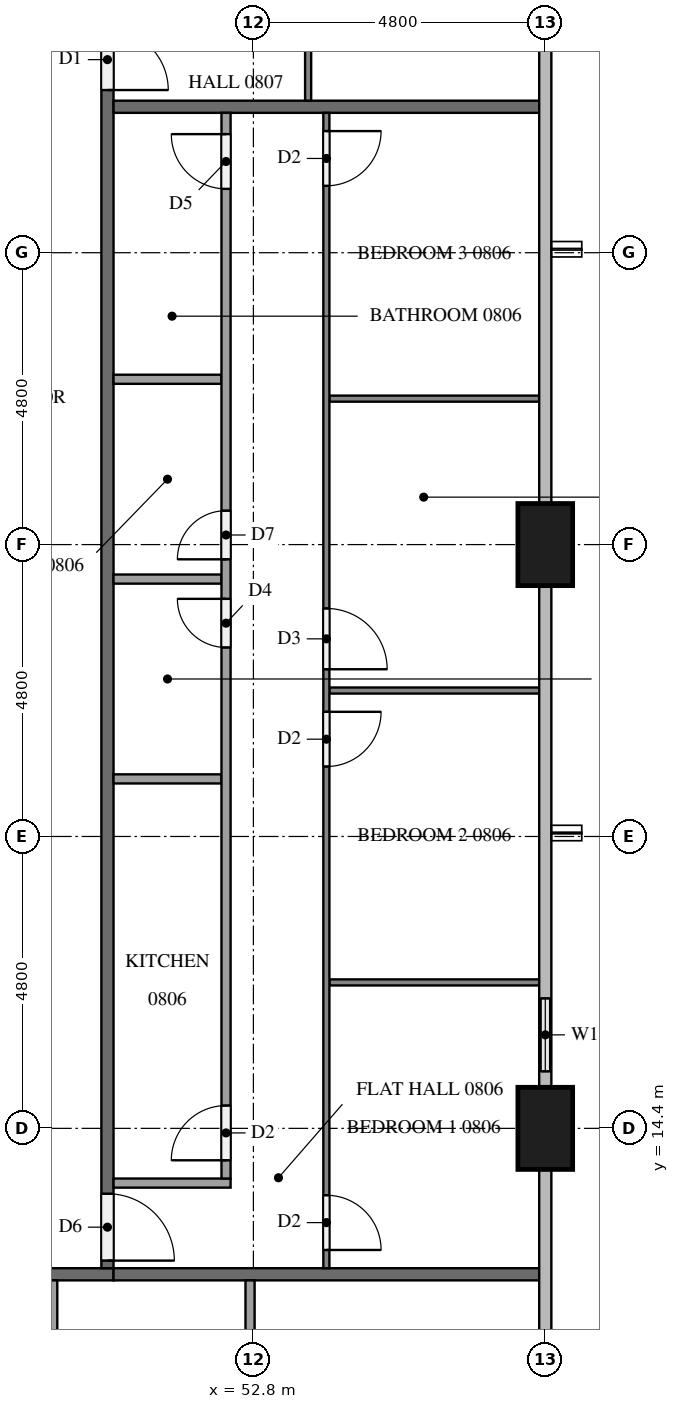
"""IFC4 building model, lengths in metres.
Left out: names, types, materials, properties, quantities, classifications, styles, units other than length and angle.
Written with IfcOpenShell. Run it as: python <this file> out.ifc"""

import sys

from ifc_helpers import new_model, si_unit, direction, frame, frame_2d, origin, origin_2d, place, context, subcontext, project, spatial, rectangle, extrude, element, fill, save


model = new_model("IFC4")
c1 = context("Model", 3, precision=1e-05, world=origin(), true_north=direction((0.0, 1.0)))
c2 = subcontext(c1, "Body", "Model", "MODEL_VIEW")
j1 = project(units=[si_unit("LENGTHUNIT", "METRE"), si_unit("PLANEANGLEUNIT", "RADIAN")], contexts=[c1])
p1 = place(None, origin())
s1 = spatial("IfcSite", under=j1, at=p1, CompositionType="ELEMENT")
p2 = place(p1, origin())
s2 = spatial("IfcBuilding", under=s1, at=p2, CompositionType="ELEMENT")
p3 = place(p2, frame((0.0, 0.0, 36.4)))
s3 = spatial("IfcBuildingStorey", under=s2, at=p3, CompositionType="ELEMENT", Elevation=36.4)
for number, where, z_axis, x_axis in (
    (1, (57.6, 14.4, 0.0), (0.0, 0.0, 1.0), (0.0, 1.0, 0.0)),
    (2, (57.6, 24.0, 0.0), (0.0, 0.0, 1.0), (0.0, 1.0, 0.0)),
):
    element("IfcColumn", number, at=place(p3, frame(where, z_axis=z_axis, x_axis=x_axis)), inside=s3, PredefinedType="COLUMN", context=c2, shape_type="SweptSolid", body=[
        extrude(rectangle(XDim=1.35, YDim=0.9, at=origin_2d()), origin(), (0.0, 0.0, 1.0), 3.2),
    ])
p4 = place(p3, frame((57.6, 15.075, 0.0), z_axis=(0.0, 0.0, 1.0), x_axis=(0.0, 1.0, 0.0)))
e3 = element("IfcWall", 3, at=p4, inside=s3, PredefinedType="SOLIDWALL", context=c2, shape_type="SweptSolid", body=[
    extrude(rectangle(XDim=1.725, YDim=0.15, at=frame_2d((0.863, 0.0))), origin(), (0.0, 0.0, 1.0), 3.2),
])
p5 = place(p4, frame((0.262, 0.0, 0.9)))
e4 = element("IfcOpeningElement", 4, at=p5, cuts=e3, PredefinedType="OPENING", context=c2, shape_type="SweptSolid", body=[
    extrude(rectangle(XDim=1.2, YDim=1.4, at=frame_2d((0.6, 0.7))), frame((0.0, 0.085, 0.0), z_axis=(0.0, -1.0, 0.0), x_axis=(1.0, 0.0, 0.0)), (0.0, 0.0, 1.0), 0.17),
])
p6 = place(p3, frame((50.5, 12.0, 0.0), z_axis=(0.0, 0.0, 1.0), x_axis=(-1.0, 0.0, 0.0)))
e5 = element("IfcWall", 5, at=p6, inside=s3, PredefinedType="PARTITIONING", context=c2, shape_type="SweptSolid", body=[
    extrude(rectangle(XDim=38.6, YDim=0.2, at=frame_2d((19.3, 0.0))), origin(), (0.0, 0.0, 1.0), 3.2),
])
p7 = place(p6, frame((36.375, 0.0, 0.0)))
e6 = element("IfcOpeningElement", 6, at=p7, cuts=e5, PredefinedType="OPENING", context=c2, shape_type="SweptSolid", body=[
    extrude(rectangle(XDim=1.0, YDim=2.1, at=frame_2d((0.5, 1.05))), frame((0.0, 0.11, 0.0), z_axis=(0.0, -1.0, 0.0), x_axis=(1.0, 0.0, 0.0)), (0.0, 0.0, 1.0), 0.22),
])
p8 = place(p6, frame((34.825, 0.0, 0.0)))
e7 = element("IfcOpeningElement", 7, at=p8, cuts=e5, PredefinedType="OPENING", context=c2, shape_type="SweptSolid", body=[
    extrude(rectangle(XDim=1.0, YDim=2.1, at=frame_2d((0.5, 1.05))), frame((0.0, 0.11, 0.0), z_axis=(0.0, -1.0, 0.0), x_axis=(1.0, 0.0, 0.0)), (0.0, 0.0, 1.0), 0.22),
])
p9 = place(p6, frame((22.825, 0.0, 0.0)))
e8 = element("IfcOpeningElement", 8, at=p9, cuts=e5, PredefinedType="OPENING", context=c2, shape_type="SweptSolid", body=[
    extrude(rectangle(XDim=1.0, YDim=2.1, at=frame_2d((0.5, 1.05))), frame((0.0, 0.11, 0.0), z_axis=(0.0, -1.0, 0.0), x_axis=(1.0, 0.0, 0.0)), (0.0, 0.0, 1.0), 0.22),
])
p10 = place(p6, frame((8.425, 0.0, 0.0)))
e9 = element("IfcOpeningElement", 9, at=p10, cuts=e5, PredefinedType="OPENING", context=c2, shape_type="SweptSolid", body=[
    extrude(rectangle(XDim=1.0, YDim=2.1, at=frame_2d((0.5, 1.05))), frame((0.0, 0.11, 0.0), z_axis=(0.0, -1.0, 0.0), x_axis=(1.0, 0.0, 0.0)), (0.0, 0.0, 1.0), 0.22),
])
p11 = place(p6, frame((1.225, 0.0, 0.0)))
e10 = element("IfcOpeningElement", 10, at=p11, cuts=e5, PredefinedType="OPENING", context=c2, shape_type="SweptSolid", body=[
    extrude(rectangle(XDim=1.0, YDim=2.1, at=frame_2d((0.5, 1.05))), frame((0.0, 0.11, 0.0), z_axis=(0.0, -1.0, 0.0), x_axis=(1.0, 0.0, 0.0)), (0.0, 0.0, 1.0), 0.22),
])
p12 = place(p3, frame((50.4, 40.7, 0.0), z_axis=(0.0, 0.0, 1.0), x_axis=(0.0, -1.0, 0.0)))
e11 = element("IfcWall", 11, at=p12, inside=s3, PredefinedType="PARTITIONING", context=c2, shape_type="SweptSolid", body=[
    extrude(rectangle(XDim=28.6, YDim=0.2, at=frame_2d((14.3, 0.0))), origin(), (0.0, 0.0, 1.0), 3.2),
])
p13 = place(p12, frame((27.375, 0.0, 0.0)))
e12 = element("IfcOpeningElement", 12, at=p13, cuts=e11, PredefinedType="OPENING", context=c2, shape_type="SweptSolid", body=[
    extrude(rectangle(XDim=1.1, YDim=2.1, at=frame_2d((0.55, 1.05))), frame((0.0, 0.11, 0.0), z_axis=(0.0, -1.0, 0.0), x_axis=(1.0, 0.0, 0.0)), (0.0, 0.0, 1.0), 0.22),
])
p14 = place(p12, frame((8.225, 0.0, 0.0)))
e13 = element("IfcOpeningElement", 13, at=p14, cuts=e11, PredefinedType="OPENING", context=c2, shape_type="SweptSolid", body=[
    extrude(rectangle(XDim=1.0, YDim=2.1, at=frame_2d((0.5, 1.05))), frame((0.0, 0.11, 0.0), z_axis=(0.0, -1.0, 0.0), x_axis=(1.0, 0.0, 0.0)), (0.0, 0.0, 1.0), 0.22),
])
for number, where, z_axis, x_axis in (
    (14, (50.5, 12.0, 0.0), (0.0, 0.0, 1.0), (1.0, 0.0, 0.0)),
    (15, (50.5, 31.2, 0.0), (0.0, 0.0, 1.0), (1.0, 0.0, 0.0)),
):
    element("IfcWall", number, at=place(p3, frame(where, z_axis=z_axis, x_axis=x_axis)), inside=s3, PredefinedType="PARTITIONING", context=c2, shape_type="SweptSolid", body=[
        extrude(rectangle(XDim=7.0, YDim=0.2, at=frame_2d((3.5, 0.0))), origin(), (0.0, 0.0, 1.0), 3.2),
    ])
p15 = place(p3, frame((52.745, 11.9, 0.0), z_axis=(0.0, 0.0, 1.0), x_axis=(0.0, -1.0, 0.0)))
e16 = element("IfcWall", 16, at=p15, inside=s3, PredefinedType="PARTITIONING", context=c2, shape_type="SweptSolid", body=[
    extrude(rectangle(XDim=3.275, YDim=0.15, at=frame_2d((1.637, 0.0))), origin(), (0.0, 0.0, 1.0), 3.2),
])
p16 = place(p3, frame((49.5, 11.9, 0.0), z_axis=(0.0, 0.0, 1.0), x_axis=(0.0, -1.0, 0.0)))
e17 = element("IfcWall", 17, at=p16, inside=s3, PredefinedType="PARTITIONING", context=c2, shape_type="SweptSolid", body=[
    extrude(rectangle(XDim=3.425, YDim=0.15, at=frame_2d((1.712, 0.0))), origin(), (0.0, 0.0, 1.0), 3.2),
])
for number, where, z_axis, x_axis in (
    (18, (54.05, 16.8, 0.0), (0.0, 0.0, 1.0), (1.0, 0.0, 0.0)),
    (19, (54.05, 21.6, 0.0), (0.0, 0.0, 1.0), (1.0, 0.0, 0.0)),
    (20, (54.05, 26.4, 0.0), (0.0, 0.0, 1.0), (1.0, 0.0, 0.0)),
):
    element("IfcWall", number, at=place(p3, frame(where, z_axis=z_axis, x_axis=x_axis)), inside=s3, PredefinedType="PARTITIONING", context=c2, shape_type="SweptSolid", body=[
        extrude(rectangle(XDim=3.45, YDim=0.1, at=frame_2d((1.725, 0.0))), origin(), (0.0, 0.0, 1.0), 3.2),
    ])
p17 = place(p3, frame((54.0, 31.1, 0.0), z_axis=(0.0, 0.0, 1.0), x_axis=(0.0, -1.0, 0.0)))
e21 = element("IfcWall", 21, at=p17, inside=s3, PredefinedType="PARTITIONING", context=c2, shape_type="SweptSolid", body=[
    extrude(rectangle(XDim=19.0, YDim=0.1, at=frame_2d((9.5, 0.0))), origin(), (0.0, 0.0, 1.0), 3.2),
])
p18 = place(p17, frame((17.8, 0.0, 0.0)))
e22 = element("IfcOpeningElement", 22, at=p18, cuts=e21, PredefinedType="OPENING", context=c2, shape_type="SweptSolid", body=[
    extrude(rectangle(XDim=0.9, YDim=2.1, at=frame_2d((0.45, 1.05))), frame((0.0, 0.06, 0.0), z_axis=(0.0, -1.0, 0.0), x_axis=(1.0, 0.0, 0.0)), (0.0, 0.0, 1.0), 0.12),
])
p19 = place(p17, frame((9.85, 0.0, 0.0)))
e23 = element("IfcOpeningElement", 23, at=p19, cuts=e21, PredefinedType="OPENING", context=c2, shape_type="SweptSolid", body=[
    extrude(rectangle(XDim=0.9, YDim=2.1, at=frame_2d((0.45, 1.05))), frame((0.0, 0.06, 0.0), z_axis=(0.0, -1.0, 0.0), x_axis=(1.0, 0.0, 0.0)), (0.0, 0.0, 1.0), 0.12),
])
p20 = place(p17, frame((8.15, 0.0, 0.0)))
e24 = element("IfcOpeningElement", 24, at=p20, cuts=e21, PredefinedType="OPENING", context=c2, shape_type="SweptSolid", body=[
    extrude(rectangle(XDim=1.0, YDim=2.1, at=frame_2d((0.5, 1.05))), frame((0.0, 0.06, 0.0), z_axis=(0.0, -1.0, 0.0), x_axis=(1.0, 0.0, 0.0)), (0.0, 0.0, 1.0), 0.12),
])
p21 = place(p17, frame((0.3, 0.0, 0.0)))
e25 = element("IfcOpeningElement", 25, at=p21, cuts=e21, PredefinedType="OPENING", context=c2, shape_type="SweptSolid", body=[
    extrude(rectangle(XDim=0.9, YDim=2.1, at=frame_2d((0.45, 1.05))), frame((0.0, 0.06, 0.0), z_axis=(0.0, -1.0, 0.0), x_axis=(1.0, 0.0, 0.0)), (0.0, 0.0, 1.0), 0.12),
])
for number, where, z_axis, x_axis in (
    (26, (50.5, 20.147, 0.0), (0.0, 0.0, 1.0), (1.0, 0.0, 0.0)),
    (27, (50.5, 23.433, 0.0), (0.0, 0.0, 1.0), (1.0, 0.0, 0.0)),
    (28, (50.5, 26.719, 0.0), (0.0, 0.0, 1.0), (1.0, 0.0, 0.0)),
):
    element("IfcWall", number, at=place(p3, frame(where, z_axis=z_axis, x_axis=x_axis)), inside=s3, PredefinedType="PARTITIONING", context=c2, shape_type="SweptSolid", body=[
        extrude(rectangle(XDim=1.775, YDim=0.15, at=frame_2d((0.887, 0.0))), origin(), (0.0, 0.0, 1.0), 3.2),
    ])
p22 = place(p3, frame((50.5, 13.5, 0.0), z_axis=(0.0, 0.0, 1.0), x_axis=(1.0, 0.0, 0.0)))
e29 = element("IfcWall", 29, at=p22, inside=s3, PredefinedType="PARTITIONING", context=c2, shape_type="SweptSolid", body=[
    extrude(rectangle(XDim=1.925, YDim=0.15, at=frame_2d((0.962, 0.0))), origin(), (0.0, 0.0, 1.0), 3.2),
])
p23 = place(p3, frame((52.35, 13.575, 0.0), z_axis=(0.0, 0.0, 1.0), x_axis=(0.0, 1.0, 0.0)))
e30 = element("IfcWall", 30, at=p23, inside=s3, PredefinedType="PARTITIONING", context=c2, shape_type="SweptSolid", body=[
    extrude(rectangle(XDim=17.525, YDim=0.15, at=frame_2d((8.763, 0.0))), origin(), (0.0, 0.0, 1.0), 3.2),
])
p24 = place(p23, frame((0.3, 0.0, 0.0)))
e31 = element("IfcOpeningElement", 31, at=p24, cuts=e30, PredefinedType="OPENING", context=c2, shape_type="SweptSolid", body=[
    extrude(rectangle(XDim=0.9, YDim=2.1, at=frame_2d((0.45, 1.05))), frame((0.0, 0.085, 0.0), z_axis=(0.0, -1.0, 0.0), x_axis=(1.0, 0.0, 0.0)), (0.0, 0.0, 1.0), 0.17),
])
p25 = place(p23, frame((8.733, 0.0, 0.0)))
e32 = element("IfcOpeningElement", 32, at=p25, cuts=e30, PredefinedType="OPENING", context=c2, shape_type="SweptSolid", body=[
    extrude(rectangle(XDim=0.8, YDim=2.1, at=frame_2d((0.4, 1.05))), frame((0.0, 0.085, 0.0), z_axis=(0.0, -1.0, 0.0), x_axis=(1.0, 0.0, 0.0)), (0.0, 0.0, 1.0), 0.17),
])
p26 = place(p23, frame((10.183, 0.0, 0.0)))
e33 = element("IfcOpeningElement", 33, at=p26, cuts=e30, PredefinedType="OPENING", context=c2, shape_type="SweptSolid", body=[
    extrude(rectangle(XDim=0.8, YDim=2.1, at=frame_2d((0.4, 1.05))), frame((0.0, 0.085, 0.0), z_axis=(0.0, -1.0, 0.0), x_axis=(1.0, 0.0, 0.0)), (0.0, 0.0, 1.0), 0.17),
])
p27 = place(p23, frame((16.275, 0.0, 0.0)))
e34 = element("IfcOpeningElement", 34, at=p27, cuts=e30, PredefinedType="OPENING", context=c2, shape_type="SweptSolid", body=[
    extrude(rectangle(XDim=0.9, YDim=2.1, at=frame_2d((0.45, 1.05))), frame((0.0, 0.085, 0.0), z_axis=(0.0, -1.0, 0.0), x_axis=(1.0, 0.0, 0.0)), (0.0, 0.0, 1.0), 0.17),
])
p28 = place(p3, frame((53.7, 47.659, 0.0), z_axis=(0.0, 0.0, 1.0), x_axis=(0.0, -1.0, 0.0)))
e35 = element("IfcWall", 35, at=p28, inside=s3, PredefinedType="PARTITIONING", context=c2, shape_type="SweptSolid", body=[
    extrude(rectangle(XDim=16.359, YDim=0.1, at=frame_2d((8.179, 0.0))), origin(), (0.0, 0.0, 1.0), 3.2),
])
p29 = place(p28, frame((12.009, 0.0, 0.0)))
e36 = element("IfcOpeningElement", 36, at=p29, cuts=e35, PredefinedType="OPENING", context=c2, shape_type="SweptSolid", body=[
    extrude(rectangle(XDim=0.9, YDim=2.1, at=frame_2d((0.45, 1.05))), frame((0.0, 0.06, 0.0), z_axis=(0.0, -1.0, 0.0), x_axis=(1.0, 0.0, 0.0)), (0.0, 0.0, 1.0), 0.12),
])
p30 = place(p28, frame((10.309, 0.0, 0.0)))
e37 = element("IfcOpeningElement", 37, at=p30, cuts=e35, PredefinedType="OPENING", context=c2, shape_type="SweptSolid", body=[
    extrude(rectangle(XDim=1.0, YDim=2.1, at=frame_2d((0.5, 1.05))), frame((0.0, 0.06, 0.0), z_axis=(0.0, -1.0, 0.0), x_axis=(1.0, 0.0, 0.0)), (0.0, 0.0, 1.0), 0.12),
])
p31 = place(p28, frame((0.3, 0.0, 0.0)))
e38 = element("IfcOpeningElement", 38, at=p31, cuts=e35, PredefinedType="OPENING", context=c2, shape_type="SweptSolid", body=[
    extrude(rectangle(XDim=0.9, YDim=2.1, at=frame_2d((0.45, 1.05))), frame((0.0, 0.06, 0.0), z_axis=(0.0, -1.0, 0.0), x_axis=(1.0, 0.0, 0.0)), (0.0, 0.0, 1.0), 0.12),
])
p32 = place(p5, origin())
e39 = element("IfcWindow", 39, at=p32, inside=s3, PartitioningType="SINGLE_PANEL", PredefinedType="WINDOW", context=c2, shape_type="SweptSolid", body=[
    extrude(rectangle(XDim=1.2, YDim=1.4, at=frame_2d((0.6, 0.7))), frame((0.0, 0.03, 0.0), z_axis=(0.0, -1.0, 0.0), x_axis=(1.0, 0.0, 0.0)), (0.0, 0.0, 1.0), 0.06),
])
fill(e4, e39)
p33 = place(p13, origin())
e40 = element("IfcDoor", 40, at=p33, inside=s3, OperationType="SINGLE_SWING_RIGHT", PredefinedType="DOOR", context=c2, shape_type="SweptSolid", body=[
    extrude(rectangle(XDim=1.1, YDim=2.1, at=frame_2d((0.55, 1.05))), frame((0.0, 0.025, 0.0), z_axis=(0.0, -1.0, 0.0), x_axis=(1.0, 0.0, 0.0)), (0.0, 0.0, 1.0), 0.05),
])
fill(e12, e40)
p34 = place(p14, origin())
e41 = element("IfcDoor", 41, at=p34, inside=s3, OperationType="SINGLE_SWING_RIGHT", PredefinedType="DOOR", context=c2, shape_type="SweptSolid", body=[
    extrude(rectangle(XDim=1.0, YDim=2.1, at=frame_2d((0.5, 1.05))), frame((0.0, 0.025, 0.0), z_axis=(0.0, -1.0, 0.0), x_axis=(1.0, 0.0, 0.0)), (0.0, 0.0, 1.0), 0.05),
])
fill(e13, e41)
p35 = place(p18, origin())
e42 = element("IfcDoor", 42, at=p35, inside=s3, OperationType="SINGLE_SWING_RIGHT", PredefinedType="DOOR", context=c2, shape_type="SweptSolid", body=[
    extrude(rectangle(XDim=0.9, YDim=2.1, at=frame_2d((0.45, 1.05))), frame((0.0, 0.025, 0.0), z_axis=(0.0, -1.0, 0.0), x_axis=(1.0, 0.0, 0.0)), (0.0, 0.0, 1.0), 0.05),
])
fill(e22, e42)
p36 = place(p19, origin())
e43 = element("IfcDoor", 43, at=p36, inside=s3, OperationType="SINGLE_SWING_LEFT", PredefinedType="DOOR", context=c2, shape_type="SweptSolid", body=[
    extrude(rectangle(XDim=0.9, YDim=2.1, at=frame_2d((0.45, 1.05))), frame((0.0, 0.025, 0.0), z_axis=(0.0, -1.0, 0.0), x_axis=(1.0, 0.0, 0.0)), (0.0, 0.0, 1.0), 0.05),
])
fill(e23, e43)
p37 = place(p20, origin())
e44 = element("IfcDoor", 44, at=p37, inside=s3, OperationType="SINGLE_SWING_RIGHT", PredefinedType="DOOR", context=c2, shape_type="SweptSolid", body=[
    extrude(rectangle(XDim=1.0, YDim=2.1, at=frame_2d((0.5, 1.05))), frame((0.0, 0.025, 0.0), z_axis=(0.0, -1.0, 0.0), x_axis=(1.0, 0.0, 0.0)), (0.0, 0.0, 1.0), 0.05),
])
fill(e24, e44)
p38 = place(p21, origin())
e45 = element("IfcDoor", 45, at=p38, inside=s3, OperationType="SINGLE_SWING_LEFT", PredefinedType="DOOR", context=c2, shape_type="SweptSolid", body=[
    extrude(rectangle(XDim=0.9, YDim=2.1, at=frame_2d((0.45, 1.05))), frame((0.0, 0.025, 0.0), z_axis=(0.0, -1.0, 0.0), x_axis=(1.0, 0.0, 0.0)), (0.0, 0.0, 1.0), 0.05),
])
fill(e25, e45)
p39 = place(p24, origin())
e46 = element("IfcDoor", 46, at=p39, inside=s3, OperationType="SINGLE_SWING_LEFT", PredefinedType="DOOR", context=c2, shape_type="SweptSolid", body=[
    extrude(rectangle(XDim=0.9, YDim=2.1, at=frame_2d((0.45, 1.05))), frame((0.0, 0.025, 0.0), z_axis=(0.0, -1.0, 0.0), x_axis=(1.0, 0.0, 0.0)), (0.0, 0.0, 1.0), 0.05),
])
fill(e31, e46)
p40 = place(p25, origin())
e47 = element("IfcDoor", 47, at=p40, inside=s3, OperationType="SINGLE_SWING_RIGHT", PredefinedType="DOOR", context=c2, shape_type="SweptSolid", body=[
    extrude(rectangle(XDim=0.8, YDim=2.1, at=frame_2d((0.4, 1.05))), frame((0.0, 0.025, 0.0), z_axis=(0.0, -1.0, 0.0), x_axis=(1.0, 0.0, 0.0)), (0.0, 0.0, 1.0), 0.05),
])
fill(e32, e47)
p41 = place(p26, origin())
e48 = element("IfcDoor", 48, at=p41, inside=s3, OperationType="SINGLE_SWING_LEFT", PredefinedType="DOOR", context=c2, shape_type="SweptSolid", body=[
    extrude(rectangle(XDim=0.8, YDim=2.1, at=frame_2d((0.4, 1.05))), frame((0.0, 0.025, 0.0), z_axis=(0.0, -1.0, 0.0), x_axis=(1.0, 0.0, 0.0)), (0.0, 0.0, 1.0), 0.05),
])
fill(e33, e48)
p42 = place(p27, origin())
e49 = element("IfcDoor", 49, at=p42, inside=s3, OperationType="SINGLE_SWING_RIGHT", PredefinedType="DOOR", context=c2, shape_type="SweptSolid", body=[
    extrude(rectangle(XDim=0.9, YDim=2.1, at=frame_2d((0.45, 1.05))), frame((0.0, 0.025, 0.0), z_axis=(0.0, -1.0, 0.0), x_axis=(1.0, 0.0, 0.0)), (0.0, 0.0, 1.0), 0.05),
])
fill(e34, e49)
save(model, sys.argv[1])
